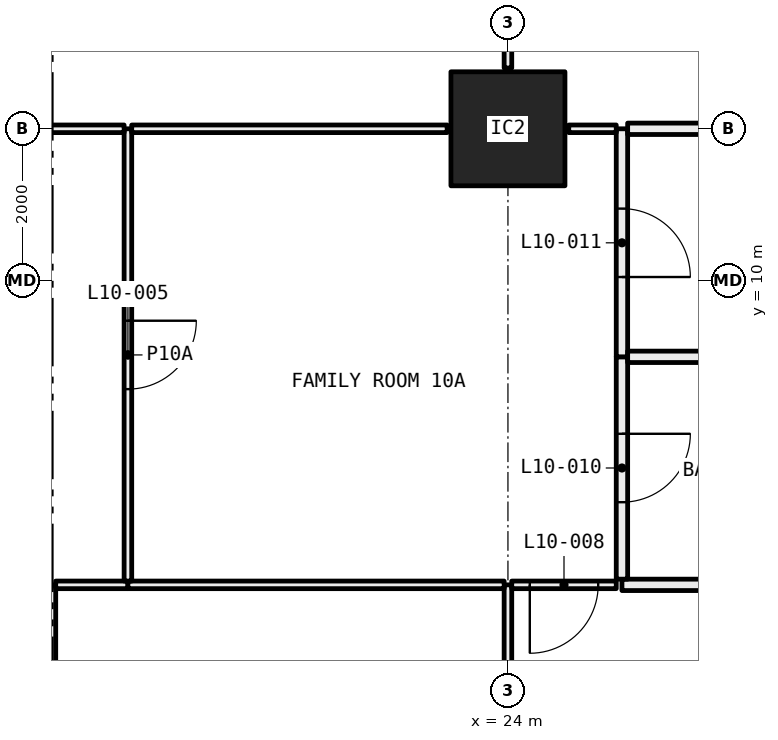
"""IFC4 building model, lengths in metres.
Left out: names, types, materials, properties, quantities, classifications, styles, units other than length and angle.
Written with IfcOpenShell. Run it as: python <this file> out.ifc"""

import sys

from ifc_helpers import new_model, si_unit, direction, frame, frame_2d, origin, origin_2d, place, context, subcontext, project, spatial, rectangle, hollow_rectangle, extrude, element, fill, save


model = new_model("IFC4")
c1 = context("Model", 3, precision=1e-05, world=origin(), true_north=direction((0.0, 1.0)))
c2 = subcontext(c1, "Body", "Model", "MODEL_VIEW")
j1 = project(units=[si_unit("LENGTHUNIT", "METRE"), si_unit("PLANEANGLEUNIT", "RADIAN")], contexts=[c1])
p1 = place(None, origin())
s1 = spatial("IfcSite", under=j1, at=p1, CompositionType="ELEMENT")
p2 = place(p1, origin())
s2 = spatial("IfcBuilding", under=s1, at=p2, CompositionType="ELEMENT")
p3 = place(p2, frame((0.0, 0.0, 47.25)))
s3 = spatial("IfcBuildingStorey", under=s2, at=p3, CompositionType="ELEMENT", Elevation=47.25)
p4 = place(p3, frame((24.0, 12.0, 0.0), z_axis=(0.0, 0.0, 1.0), x_axis=(1.0, 0.0, 0.0)))
e1 = element("IfcColumn", 1, at=p4, inside=s3, PredefinedType="COLUMN", context=c2, shape_type="SweptSolid", body=[
    extrude(hollow_rectangle(XDim=1.5, YDim=1.5, WallThickness=0.065, at=origin_2d()), origin(), (0.0, 0.0, 1.0), 3.05),
])
p5 = place(p3, frame((18.0, 0.72, 0.0), z_axis=(0.0, 0.0, 1.0), x_axis=(0.0, 1.0, 0.0)))
e2 = element("IfcWall", 2, at=p5, inside=s3, PredefinedType="PARTITIONING", context=c2, shape_type="SweptSolid", body=[
    extrude(rectangle(XDim=5.28, YDim=0.1, at=frame_2d((2.64, 0.0))), origin(), (0.0, 0.0, 1.0), 3.05),
])
p6 = place(p5, frame((2.19, 0.0, 0.0)))
e3 = element("IfcOpeningElement", 3, at=p6, cuts=e2, PredefinedType="OPENING", context=c2, shape_type="SweptSolid", body=[
    extrude(rectangle(XDim=0.9, YDim=2.1, at=frame_2d((0.45, 1.05))), frame((0.0, 0.06, 0.0), z_axis=(0.0, -1.0, 0.0), x_axis=(1.0, 0.0, 0.0)), (0.0, 0.0, 1.0), 0.12),
])
p7 = place(p3, frame((24.0, 0.72, 0.0), z_axis=(0.0, 0.0, 1.0), x_axis=(0.0, 1.0, 0.0)))
e4 = element("IfcWall", 4, at=p7, inside=s3, PredefinedType="PARTITIONING", context=c2, shape_type="SweptSolid", body=[
    extrude(rectangle(XDim=5.28, YDim=0.1, at=frame_2d((2.64, 0.0))), origin(), (0.0, 0.0, 1.0), 2.45),
])
p8 = place(p3, frame((19.0, 6.0, 0.0), z_axis=(0.0, 0.0, 1.0), x_axis=(-1.0, 0.0, 0.0)))
e5 = element("IfcWall", 5, at=p8, inside=s3, PredefinedType="PARTITIONING", context=c2, shape_type="SweptSolid", body=[
    extrude(rectangle(XDim=0.95, YDim=0.1, at=frame_2d((0.475, 0.0))), origin(), (0.0, 0.0, 1.0), 3.05),
])
p9 = place(p3, frame((23.95, 6.0, 0.0), z_axis=(0.0, 0.0, 1.0), x_axis=(-1.0, 0.0, 0.0)))
e6 = element("IfcWall", 6, at=p9, inside=s3, PredefinedType="PARTITIONING", context=c2, shape_type="SweptSolid", body=[
    extrude(rectangle(XDim=4.95, YDim=0.1, at=frame_2d((2.475, 0.0))), origin(), (0.0, 0.0, 1.0), 2.45),
])
p10 = place(p3, frame((25.425, 6.0, 0.0), z_axis=(0.0, 0.0, 1.0), x_axis=(-1.0, 0.0, 0.0)))
e7 = element("IfcWall", 7, at=p10, inside=s3, PredefinedType="PARTITIONING", context=c2, shape_type="SweptSolid", body=[
    extrude(rectangle(XDim=1.375, YDim=0.1, at=frame_2d((0.688, 0.0))), origin(), (0.0, 0.0, 1.0), 2.45),
])
p11 = place(p10, frame((0.238, 0.0, 0.0)))
e8 = element("IfcOpeningElement", 8, at=p11, cuts=e7, PredefinedType="OPENING", context=c2, shape_type="SweptSolid", body=[
    extrude(rectangle(XDim=0.9, YDim=2.1, at=frame_2d((0.45, 1.05))), frame((0.0, 0.06, 0.0), z_axis=(0.0, -1.0, 0.0), x_axis=(1.0, 0.0, 0.0)), (0.0, 0.0, 1.0), 0.12),
])
p12 = place(p3, frame((29.9, 6.0, 0.0), z_axis=(0.0, 0.0, 1.0), x_axis=(-1.0, 0.0, 0.0)))
e9 = element("IfcWall", 9, at=p12, inside=s3, PredefinedType="PARTITIONING", context=c2, shape_type="SweptSolid", body=[
    extrude(rectangle(XDim=4.4, YDim=0.15, at=frame_2d((2.2, 0.0))), origin(), (0.0, 0.0, 1.0), 3.05),
])
p13 = place(p3, frame((19.0, 6.05, 0.0), z_axis=(0.0, 0.0, 1.0), x_axis=(0.0, 1.0, 0.0)))
e10 = element("IfcWall", 10, at=p13, inside=s3, PredefinedType="PARTITIONING", context=c2, shape_type="SweptSolid", body=[
    extrude(rectangle(XDim=5.95, YDim=0.1, at=frame_2d((2.975, 0.0))), origin(), (0.0, 0.0, 1.0), 2.45),
])
p14 = place(p13, frame((2.525, 0.0, 0.0)))
e11 = element("IfcOpeningElement", 11, at=p14, cuts=e10, PredefinedType="OPENING", context=c2, shape_type="SweptSolid", body=[
    extrude(rectangle(XDim=0.9, YDim=2.1, at=frame_2d((0.45, 1.05))), frame((0.0, 0.06, 0.0), z_axis=(0.0, -1.0, 0.0), x_axis=(1.0, 0.0, 0.0)), (0.0, 0.0, 1.0), 0.12),
])
p15 = place(p3, frame((18.95, 12.0, 0.0), z_axis=(0.0, 0.0, 1.0), x_axis=(-1.0, 0.0, 0.0)))
e12 = element("IfcWall", 12, at=p15, inside=s3, PredefinedType="PARTITIONING", context=c2, shape_type="SweptSolid", body=[
    extrude(rectangle(XDim=2.45, YDim=0.1, at=frame_2d((1.225, 0.0))), origin(), (0.0, 0.0, 1.0), 2.45),
])
p16 = place(p3, frame((25.5, 6.075, 0.0), z_axis=(0.0, 0.0, 1.0), x_axis=(0.0, 1.0, 0.0)))
e13 = element("IfcWall", 13, at=p16, inside=s3, PredefinedType="PARTITIONING", context=c2, shape_type="SweptSolid", body=[
    extrude(rectangle(XDim=2.925, YDim=0.15, at=frame_2d((1.462, 0.0))), origin(), (0.0, 0.0, 1.0), 3.05),
])
p17 = place(p16, frame((1.012, 0.0, 0.0)))
e14 = element("IfcOpeningElement", 14, at=p17, cuts=e13, PredefinedType="OPENING", context=c2, shape_type="SweptSolid", body=[
    extrude(rectangle(XDim=0.9, YDim=2.1, at=frame_2d((0.45, 1.05))), frame((0.0, 0.085, 0.0), z_axis=(0.0, -1.0, 0.0), x_axis=(1.0, 0.0, 0.0)), (0.0, 0.0, 1.0), 0.17),
])
p18 = place(p3, frame((25.5, 9.0, 0.0), z_axis=(0.0, 0.0, 1.0), x_axis=(0.0, 1.0, 0.0)))
e15 = element("IfcWall", 15, at=p18, inside=s3, PredefinedType="PARTITIONING", context=c2, shape_type="SweptSolid", body=[
    extrude(rectangle(XDim=3.0, YDim=0.15, at=frame_2d((1.5, 0.0))), origin(), (0.0, 0.0, 1.0), 2.45),
])
p19 = place(p18, frame((1.05, 0.0, 0.0)))
e16 = element("IfcOpeningElement", 16, at=p19, cuts=e15, PredefinedType="OPENING", context=c2, shape_type="SweptSolid", body=[
    extrude(rectangle(XDim=0.9, YDim=2.1, at=frame_2d((0.45, 1.05))), frame((0.0, 0.085, 0.0), z_axis=(0.0, -1.0, 0.0), x_axis=(1.0, 0.0, 0.0)), (0.0, 0.0, 1.0), 0.17),
])
p20 = place(p3, frame((23.2, 12.0, 0.0), z_axis=(0.0, 0.0, 1.0), x_axis=(-1.0, 0.0, 0.0)))
e17 = element("IfcWall", 17, at=p20, inside=s3, PredefinedType="PARTITIONING", context=c2, shape_type="SweptSolid", body=[
    extrude(rectangle(XDim=4.15, YDim=0.1, at=frame_2d((2.075, 0.0))), origin(), (0.0, 0.0, 1.0), 2.45),
])
p21 = place(p3, frame((25.425, 12.0, 0.0), z_axis=(0.0, 0.0, 1.0), x_axis=(-1.0, 0.0, 0.0)))
e18 = element("IfcWall", 18, at=p21, inside=s3, PredefinedType="PARTITIONING", context=c2, shape_type="SweptSolid", body=[
    extrude(rectangle(XDim=0.625, YDim=0.1, at=frame_2d((0.312, 0.0))), origin(), (0.0, 0.0, 1.0), 2.45),
])
p22 = place(p3, frame((29.9, 9.0, 0.0), z_axis=(0.0, 0.0, 1.0), x_axis=(-1.0, 0.0, 0.0)))
e19 = element("IfcWall", 19, at=p22, inside=s3, PredefinedType="PARTITIONING", context=c2, shape_type="SweptSolid", body=[
    extrude(rectangle(XDim=4.325, YDim=0.15, at=frame_2d((2.163, 0.0))), origin(), (0.0, 0.0, 1.0), 3.05),
])
p23 = place(p3, frame((29.9, 12.0, 0.0), z_axis=(0.0, 0.0, 1.0), x_axis=(-1.0, 0.0, 0.0)))
e20 = element("IfcWall", 20, at=p23, inside=s3, PredefinedType="PARTITIONING", context=c2, shape_type="SweptSolid", body=[
    extrude(rectangle(XDim=4.325, YDim=0.15, at=frame_2d((2.163, 0.0))), origin(), (0.0, 0.0, 1.0), 2.45),
])
p24 = place(p3, frame((24.0, 12.8, 0.0), z_axis=(0.0, 0.0, 1.0), x_axis=(0.0, 1.0, 0.0)))
e21 = element("IfcWall", 21, at=p24, inside=s3, PredefinedType="PARTITIONING", context=c2, shape_type="SweptSolid", body=[
    extrude(rectangle(XDim=5.1, YDim=0.1, at=frame_2d((2.55, 0.0))), origin(), (0.0, 0.0, 1.0), 3.05),
])
p25 = place(p24, frame((2.1, 0.0, 0.0)))
e22 = element("IfcOpeningElement", 22, at=p25, cuts=e21, PredefinedType="OPENING", context=c2, shape_type="SweptSolid", body=[
    extrude(rectangle(XDim=0.9, YDim=2.1, at=frame_2d((0.45, 1.05))), frame((0.0, 0.06, 0.0), z_axis=(0.0, -1.0, 0.0), x_axis=(1.0, 0.0, 0.0)), (0.0, 0.0, 1.0), 0.12),
])
p26 = place(p14, frame((0.9, 0.0, 0.0), x_axis=(-1.0, 0.0, 0.0)))
e23 = element("IfcDoor", 23, at=p26, inside=s3, OperationType="SINGLE_SWING_RIGHT", PredefinedType="DOOR", context=c2, shape_type="SweptSolid", body=[
    extrude(rectangle(XDim=0.9, YDim=2.1, at=frame_2d((0.45, 1.05))), frame((0.0, 0.025, 0.0), z_axis=(0.0, -1.0, 0.0), x_axis=(1.0, 0.0, 0.0)), (0.0, 0.0, 1.0), 0.05),
])
fill(e11, e23)
p27 = place(p11, origin())
e24 = element("IfcDoor", 24, at=p27, inside=s3, OperationType="SINGLE_SWING_LEFT", PredefinedType="DOOR", context=c2, shape_type="SweptSolid", body=[
    extrude(rectangle(XDim=0.9, YDim=2.1, at=frame_2d((0.45, 1.05))), frame((0.0, 0.025, 0.0), z_axis=(0.0, -1.0, 0.0), x_axis=(1.0, 0.0, 0.0)), (0.0, 0.0, 1.0), 0.05),
])
fill(e8, e24)
p28 = place(p17, frame((0.9, 0.0, 0.0), x_axis=(-1.0, 0.0, 0.0)))
e25 = element("IfcDoor", 25, at=p28, inside=s3, OperationType="SINGLE_SWING_RIGHT", PredefinedType="DOOR", context=c2, shape_type="SweptSolid", body=[
    extrude(rectangle(XDim=0.9, YDim=2.1, at=frame_2d((0.45, 1.05))), frame((0.0, 0.025, 0.0), z_axis=(0.0, -1.0, 0.0), x_axis=(1.0, 0.0, 0.0)), (0.0, 0.0, 1.0), 0.05),
])
fill(e14, e25)
p29 = place(p19, frame((0.9, 0.0, 0.0), x_axis=(-1.0, 0.0, 0.0)))
e26 = element("IfcDoor", 26, at=p29, inside=s3, OperationType="SINGLE_SWING_LEFT", PredefinedType="DOOR", context=c2, shape_type="SweptSolid", body=[
    extrude(rectangle(XDim=0.9, YDim=2.1, at=frame_2d((0.45, 1.05))), frame((0.0, 0.025, 0.0), z_axis=(0.0, -1.0, 0.0), x_axis=(1.0, 0.0, 0.0)), (0.0, 0.0, 1.0), 0.05),
])
fill(e16, e26)
save(model, sys.argv[1])
